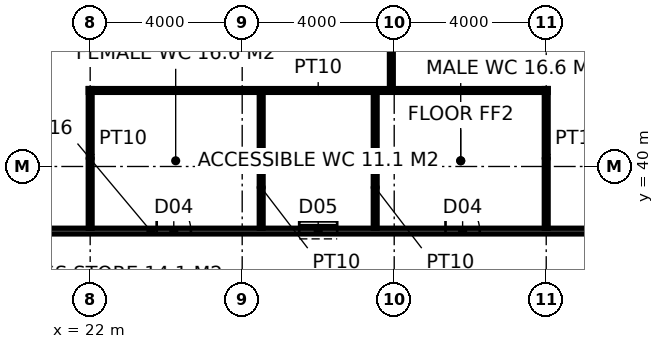
"""IFC4 building model, lengths in metres.
Left out: names, types, materials, properties, quantities, classifications, styles, units other than length and angle.
Written with IfcOpenShell. Run it as: python <this file> out.ifc"""

import sys

from ifc_helpers import new_model, si_unit, direction, frame, frame_2d, origin, place, context, subcontext, project, spatial, rectangle, extrude, element, fill, save


model = new_model("IFC4")
c1 = context("Model", 3, precision=1e-05, world=origin(), true_north=direction((0.0, 1.0)))
c2 = subcontext(c1, "Body", "Model", "MODEL_VIEW")
j1 = project(units=[si_unit("LENGTHUNIT", "METRE"), si_unit("PLANEANGLEUNIT", "RADIAN")], contexts=[c1])
p1 = place(None, origin())
s1 = spatial("IfcSite", under=j1, at=p1, CompositionType="ELEMENT")
p2 = place(p1, origin())
s2 = spatial("IfcBuilding", under=s1, at=p2, CompositionType="ELEMENT")
p3 = place(p2, frame((0.0, 0.0, 187.8)))
s3 = spatial("IfcBuildingStorey", under=s2, at=p3, CompositionType="ELEMENT", Elevation=187.8)
p4 = place(p3, frame((17.5, 38.3, 0.0), z_axis=(0.0, 0.0, 1.0), x_axis=(1.0, 0.0, 0.0)))
e1 = element("IfcWall", 1, at=p4, inside=s3, PredefinedType="PARTITIONING", context=c2, shape_type="SweptSolid", body=[
    extrude(rectangle(XDim=20.325, YDim=0.15, at=frame_2d((10.163, 0.0))), origin(), (0.0, 0.0, 1.0), 3.85),
])
p5 = place(p4, frame((6.25, 0.0, 0.0)))
e2 = element("IfcOpeningElement", 2, at=p5, cuts=e1, PredefinedType="OPENING", context=c2, shape_type="SweptSolid", body=[
    extrude(rectangle(XDim=0.9, YDim=2.1, at=frame_2d((0.45, 1.05))), frame((0.0, 0.085, 0.0), z_axis=(0.0, -1.0, 0.0), x_axis=(1.0, 0.0, 0.0)), (0.0, 0.0, 1.0), 0.17),
])
p6 = place(p4, frame((10.0, 0.0, 0.0)))
e3 = element("IfcOpeningElement", 3, at=p6, cuts=e1, PredefinedType="OPENING", context=c2, shape_type="SweptSolid", body=[
    extrude(rectangle(XDim=1.0, YDim=2.1, at=frame_2d((0.5, 1.05))), frame((0.0, 0.085, 0.0), z_axis=(0.0, -1.0, 0.0), x_axis=(1.0, 0.0, 0.0)), (0.0, 0.0, 1.0), 0.17),
])
p7 = place(p4, frame((13.85, 0.0, 0.0)))
e4 = element("IfcOpeningElement", 4, at=p7, cuts=e1, PredefinedType="OPENING", context=c2, shape_type="SweptSolid", body=[
    extrude(rectangle(XDim=0.9, YDim=2.1, at=frame_2d((0.45, 1.05))), frame((0.0, 0.085, 0.0), z_axis=(0.0, -1.0, 0.0), x_axis=(1.0, 0.0, 0.0)), (0.0, 0.0, 1.0), 0.17),
])
for number, where, z_axis, x_axis in (
    (5, (22.0, 38.375, 0.0), (0.0, 0.0, 1.0), (0.0, 1.0, 0.0)),
    (6, (34.0, 38.375, 0.0), (0.0, 0.0, 1.0), (0.0, 1.0, 0.0)),
):
    element("IfcWall", number, at=place(p3, frame(where, z_axis=z_axis, x_axis=x_axis)), inside=s3, PredefinedType="PARTITIONING", context=c2, shape_type="SweptSolid", body=[
        extrude(rectangle(XDim=3.675, YDim=0.1, at=frame_2d((1.837, 0.0))), origin(), (0.0, 0.0, 1.0), 2.95),
    ])
p8 = place(p3, frame((21.95, 42.0, 0.0), z_axis=(0.0, 0.0, 1.0), x_axis=(1.0, 0.0, 0.0)))
e7 = element("IfcWall", 7, at=p8, inside=s3, PredefinedType="PARTITIONING", context=c2, shape_type="SweptSolid", body=[
    extrude(rectangle(XDim=12.1, YDim=0.1, at=frame_2d((6.05, 0.0))), origin(), (0.0, 0.0, 1.0), 3.85),
])
for number, where, z_axis, x_axis in (
    (8, (26.5, 38.375, 0.0), (0.0, 0.0, 1.0), (0.0, 1.0, 0.0)),
    (9, (29.5, 38.375, 0.0), (0.0, 0.0, 1.0), (0.0, 1.0, 0.0)),
):
    element("IfcWall", number, at=place(p3, frame(where, z_axis=z_axis, x_axis=x_axis)), inside=s3, PredefinedType="PARTITIONING", context=c2, shape_type="SweptSolid", body=[
        extrude(rectangle(XDim=3.575, YDim=0.1, at=frame_2d((1.788, 0.0))), origin(), (0.0, 0.0, 1.0), 3.85),
    ])
p9 = place(p3, frame((29.925, 55.7, 0.0), z_axis=(0.0, 0.0, 1.0), x_axis=(0.0, -1.0, 0.0)))
e10 = element("IfcWall", 10, at=p9, inside=s3, PredefinedType="PARTITIONING", context=c2, shape_type="SweptSolid", body=[
    extrude(rectangle(XDim=13.7, YDim=0.1, at=frame_2d((6.85, 0.0))), origin(), (0.0, 0.0, 1.0), 2.95),
])
p10 = place(p9, frame((6.35, 0.0, 0.0)))
e11 = element("IfcOpeningElement", 11, at=p10, cuts=e10, PredefinedType="OPENING", context=c2, shape_type="SweptSolid", body=[
    extrude(rectangle(XDim=1.0, YDim=2.2, at=frame_2d((0.5, 1.1))), frame((0.0, 0.06, 0.0), z_axis=(0.0, -1.0, 0.0), x_axis=(1.0, 0.0, 0.0)), (0.0, 0.0, 1.0), 0.12),
])
p11 = place(p5, origin())
e12 = element("IfcDoor", 12, at=p11, inside=s3, OperationType="SINGLE_SWING_LEFT", PredefinedType="DOOR", context=c2, shape_type="SweptSolid", body=[
    extrude(rectangle(XDim=0.9, YDim=2.1, at=frame_2d((0.45, 1.05))), frame((0.0, 0.025, 0.0), z_axis=(0.0, -1.0, 0.0), x_axis=(1.0, 0.0, 0.0)), (0.0, 0.0, 1.0), 0.05),
])
fill(e2, e12)
p12 = place(p6, origin())
e13 = element("IfcDoor", 13, at=p12, inside=s3, OperationType="SLIDING_TO_LEFT", PredefinedType="DOOR", context=c2, shape_type="SweptSolid", body=[
    extrude(rectangle(XDim=1.0, YDim=2.1, at=frame_2d((0.5, 1.05))), frame((0.0, 0.025, 0.0), z_axis=(0.0, -1.0, 0.0), x_axis=(1.0, 0.0, 0.0)), (0.0, 0.0, 1.0), 0.05),
])
fill(e3, e13)
p13 = place(p7, origin())
e14 = element("IfcDoor", 14, at=p13, inside=s3, OperationType="SINGLE_SWING_LEFT", PredefinedType="DOOR", context=c2, shape_type="SweptSolid", body=[
    extrude(rectangle(XDim=0.9, YDim=2.1, at=frame_2d((0.45, 1.05))), frame((0.0, 0.025, 0.0), z_axis=(0.0, -1.0, 0.0), x_axis=(1.0, 0.0, 0.0)), (0.0, 0.0, 1.0), 0.05),
])
fill(e4, e14)
save(model, sys.argv[1])
